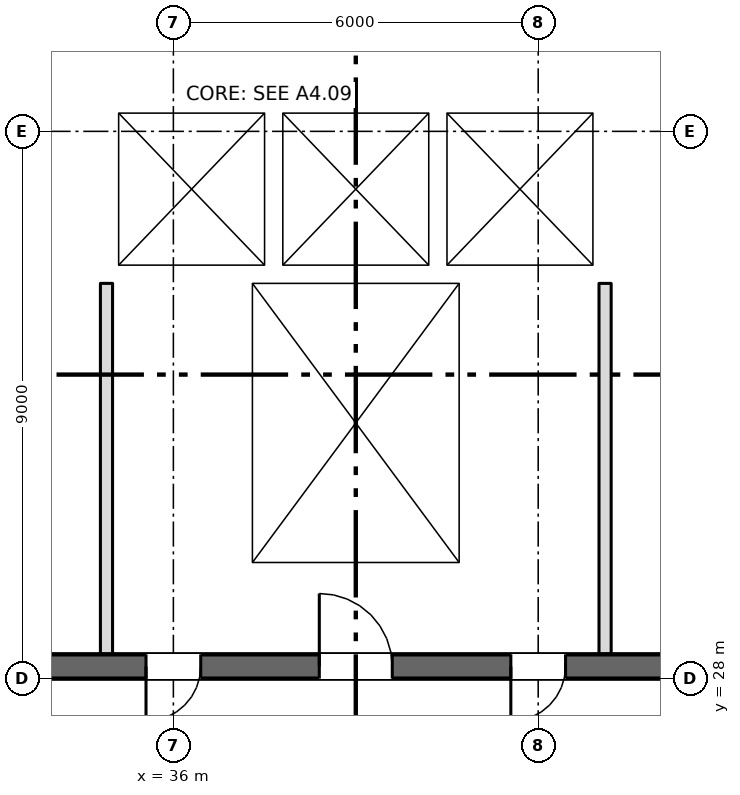
"""IFC4 building model, lengths in metres.
Left out: names, types, materials, properties, quantities, classifications, styles, units other than length and angle.
Written with IfcOpenShell. Run it as: python <this file> out.ifc"""

import sys

from ifc_helpers import new_model, si_unit, direction, frame, frame_2d, origin, place, context, subcontext, project, spatial, rectangle, extrude, element, fill, save


model = new_model("IFC4")
c1 = context("Model", 3, precision=1e-05, world=origin(), true_north=direction((0.0, 1.0)))
c2 = subcontext(c1, "Body", "Model", "MODEL_VIEW")
j1 = project(units=[si_unit("LENGTHUNIT", "METRE"), si_unit("PLANEANGLEUNIT", "RADIAN")], contexts=[c1])
p1 = place(None, origin())
s1 = spatial("IfcSite", under=j1, at=p1, CompositionType="ELEMENT")
p2 = place(p1, origin())
s2 = spatial("IfcBuilding", under=s1, at=p2, CompositionType="ELEMENT")
p3 = place(p2, frame((0.0, 0.0, 41.25)))
s3 = spatial("IfcBuildingStorey", under=s2, at=p3, CompositionType="ELEMENT", Elevation=41.25)
p4 = place(p3, frame((6.7, 28.2, 0.0), z_axis=(0.0, 0.0, 1.0), x_axis=(1.0, 0.0, 0.0)))
e1 = element("IfcWall", 1, at=p4, inside=s3, PredefinedType="SHEAR", context=c2, shape_type="SweptSolid", body=[
    extrude(rectangle(XDim=57.8, YDim=0.4, at=frame_2d((28.9, 0.0))), origin(), (0.0, 0.0, 1.0), 3.35),
])
p5 = place(p4, frame((12.812, 0.0, 0.0)))
e2 = element("IfcOpeningElement", 2, at=p5, cuts=e1, PredefinedType="OPENING", context=c2, shape_type="SweptSolid", body=[
    extrude(rectangle(XDim=0.9, YDim=2.1, at=frame_2d((0.45, 1.05))), frame((0.0, 0.21, 0.0), z_axis=(0.0, -1.0, 0.0), x_axis=(1.0, 0.0, 0.0)), (0.0, 0.0, 1.0), 0.42),
])
p6 = place(p4, frame((15.387, 0.0, 0.0)))
e3 = element("IfcOpeningElement", 3, at=p6, cuts=e1, PredefinedType="OPENING", context=c2, shape_type="SweptSolid", body=[
    extrude(rectangle(XDim=0.9, YDim=2.1, at=frame_2d((0.45, 1.05))), frame((0.0, 0.21, 0.0), z_axis=(0.0, -1.0, 0.0), x_axis=(1.0, 0.0, 0.0)), (0.0, 0.0, 1.0), 0.42),
])
p7 = place(p4, frame((48.312, 0.0, 0.0)))
e4 = element("IfcOpeningElement", 4, at=p7, cuts=e1, PredefinedType="OPENING", context=c2, shape_type="SweptSolid", body=[
    extrude(rectangle(XDim=0.9, YDim=2.1, at=frame_2d((0.45, 1.05))), frame((0.0, 0.21, 0.0), z_axis=(0.0, -1.0, 0.0), x_axis=(1.0, 0.0, 0.0)), (0.0, 0.0, 1.0), 0.42),
])
p8 = place(p4, frame((50.887, 0.0, 0.0)))
e5 = element("IfcOpeningElement", 5, at=p8, cuts=e1, PredefinedType="OPENING", context=c2, shape_type="SweptSolid", body=[
    extrude(rectangle(XDim=0.9, YDim=2.1, at=frame_2d((0.45, 1.05))), frame((0.0, 0.21, 0.0), z_axis=(0.0, -1.0, 0.0), x_axis=(1.0, 0.0, 0.0)), (0.0, 0.0, 1.0), 0.42),
])
p9 = place(p4, frame((0.562, 0.0, 0.0)))
e6 = element("IfcOpeningElement", 6, at=p9, cuts=e1, PredefinedType="OPENING", context=c2, shape_type="SweptSolid", body=[
    extrude(rectangle(XDim=0.9, YDim=2.1, at=frame_2d((0.45, 1.05))), frame((0.0, 0.21, 0.0), z_axis=(0.0, -1.0, 0.0), x_axis=(1.0, 0.0, 0.0)), (0.0, 0.0, 1.0), 0.42),
])
p10 = place(p4, frame((2.137, 0.0, 0.0)))
e7 = element("IfcOpeningElement", 7, at=p10, cuts=e1, PredefinedType="OPENING", context=c2, shape_type="SweptSolid", body=[
    extrude(rectangle(XDim=0.9, YDim=2.1, at=frame_2d((0.45, 1.05))), frame((0.0, 0.21, 0.0), z_axis=(0.0, -1.0, 0.0), x_axis=(1.0, 0.0, 0.0)), (0.0, 0.0, 1.0), 0.42),
])
p11 = place(p4, frame((4.7, 0.0, 0.0)))
e8 = element("IfcOpeningElement", 8, at=p11, cuts=e1, PredefinedType="OPENING", context=c2, shape_type="SweptSolid", body=[
    extrude(rectangle(XDim=1.2, YDim=2.1, at=frame_2d((0.6, 1.05))), frame((0.0, 0.21, 0.0), z_axis=(0.0, -1.0, 0.0), x_axis=(1.0, 0.0, 0.0)), (0.0, 0.0, 1.0), 0.42),
])
p12 = place(p4, frame((31.7, 0.0, 0.0)))
e9 = element("IfcOpeningElement", 9, at=p12, cuts=e1, PredefinedType="OPENING", context=c2, shape_type="SweptSolid", body=[
    extrude(rectangle(XDim=1.2, YDim=2.1, at=frame_2d((0.6, 1.05))), frame((0.0, 0.21, 0.0), z_axis=(0.0, -1.0, 0.0), x_axis=(1.0, 0.0, 0.0)), (0.0, 0.0, 1.0), 0.42),
])
p13 = place(p4, frame((55.2, 0.0, 0.0)))
e10 = element("IfcOpeningElement", 10, at=p13, cuts=e1, PredefinedType="OPENING", context=c2, shape_type="SweptSolid", body=[
    extrude(rectangle(XDim=1.2, YDim=2.1, at=frame_2d((0.6, 1.05))), frame((0.0, 0.21, 0.0), z_axis=(0.0, -1.0, 0.0), x_axis=(1.0, 0.0, 0.0)), (0.0, 0.0, 1.0), 0.42),
])
p14 = place(p4, frame((21.7, 0.0, 0.0)))
e11 = element("IfcOpeningElement", 11, at=p14, cuts=e1, PredefinedType="OPENING", context=c2, shape_type="SweptSolid", body=[
    extrude(rectangle(XDim=1.2, YDim=2.1, at=frame_2d((0.6, 1.05))), frame((0.0, 0.21, 0.0), z_axis=(0.0, -1.0, 0.0), x_axis=(1.0, 0.0, 0.0)), (0.0, 0.0, 1.0), 0.42),
])
p15 = place(p4, frame((41.7, 0.0, 0.0)))
e12 = element("IfcOpeningElement", 12, at=p15, cuts=e1, PredefinedType="OPENING", context=c2, shape_type="SweptSolid", body=[
    extrude(rectangle(XDim=1.2, YDim=2.1, at=frame_2d((0.6, 1.05))), frame((0.0, 0.21, 0.0), z_axis=(0.0, -1.0, 0.0), x_axis=(1.0, 0.0, 0.0)), (0.0, 0.0, 1.0), 0.42),
])
p16 = place(p4, frame((24.85, 0.0, 0.0)))
e13 = element("IfcOpeningElement", 13, at=p16, cuts=e1, PredefinedType="OPENING", context=c2, shape_type="SweptSolid", body=[
    extrude(rectangle(XDim=2.4, YDim=2.1, at=frame_2d((1.2, 1.05))), frame((0.0, 0.21, 0.0), z_axis=(0.0, -1.0, 0.0), x_axis=(1.0, 0.0, 0.0)), (0.0, 0.0, 1.0), 0.42),
])
p17 = place(p4, frame((37.35, 0.0, 0.0)))
e14 = element("IfcOpeningElement", 14, at=p17, cuts=e1, PredefinedType="OPENING", context=c2, shape_type="SweptSolid", body=[
    extrude(rectangle(XDim=2.4, YDim=2.1, at=frame_2d((1.2, 1.05))), frame((0.0, 0.21, 0.0), z_axis=(0.0, -1.0, 0.0), x_axis=(1.0, 0.0, 0.0)), (0.0, 0.0, 1.0), 0.42),
])
p18 = place(p4, frame((7.85, 0.0, 0.0)))
e15 = element("IfcOpeningElement", 15, at=p18, cuts=e1, PredefinedType="OPENING", context=c2, shape_type="SweptSolid", body=[
    extrude(rectangle(XDim=2.4, YDim=2.1, at=frame_2d((1.2, 1.05))), frame((0.0, 0.21, 0.0), z_axis=(0.0, -1.0, 0.0), x_axis=(1.0, 0.0, 0.0)), (0.0, 0.0, 1.0), 0.42),
])
p19 = place(p4, frame((28.85, 0.0, 0.0)))
e16 = element("IfcOpeningElement", 16, at=p19, cuts=e1, PredefinedType="OPENING", context=c2, shape_type="SweptSolid", body=[
    extrude(rectangle(XDim=0.9, YDim=2.1, at=frame_2d((0.45, 1.05))), frame((0.0, 0.21, 0.0), z_axis=(0.0, -1.0, 0.0), x_axis=(1.0, 0.0, 0.0)), (0.0, 0.0, 1.0), 0.42),
])
p20 = place(p4, frame((34.85, 0.0, 0.0)))
e17 = element("IfcOpeningElement", 17, at=p20, cuts=e1, PredefinedType="OPENING", context=c2, shape_type="SweptSolid", body=[
    extrude(rectangle(XDim=0.9, YDim=2.1, at=frame_2d((0.45, 1.05))), frame((0.0, 0.21, 0.0), z_axis=(0.0, -1.0, 0.0), x_axis=(1.0, 0.0, 0.0)), (0.0, 0.0, 1.0), 0.42),
])
for number, where, z_axis, x_axis in (
    (18, (37.15, 28.4, 0.0), (0.0, 0.0, 1.0), (0.0, 1.0, 0.0)),
    (19, (40.85, 28.4, 0.0), (0.0, 0.0, 1.0), (0.0, 1.0, 0.0)),
):
    element("IfcWall", number, at=place(p3, frame(where, z_axis=z_axis, x_axis=x_axis)), inside=s3, PredefinedType="SHEAR", context=c2, shape_type="SweptSolid", body=[
        extrude(rectangle(XDim=6.1, YDim=0.3, at=frame_2d((3.05, 0.0))), origin(), (0.0, 0.0, 1.0), 3.35),
    ])
p21 = place(p3, frame((34.8, 34.65, 0.0), z_axis=(0.0, 0.0, 1.0), x_axis=(1.0, 0.0, 0.0)))
e20 = element("IfcWall", 20, at=p21, inside=s3, PredefinedType="SHEAR", context=c2, shape_type="SweptSolid", body=[
    extrude(rectangle(XDim=8.4, YDim=0.3, at=frame_2d((4.2, 0.0))), origin(), (0.0, 0.0, 1.0), 3.35),
])
p22 = place(p3, frame((34.8, 37.45, 0.0), z_axis=(0.0, 0.0, 1.0), x_axis=(1.0, 0.0, 0.0)))
e21 = element("IfcWall", 21, at=p22, inside=s3, PredefinedType="SHEAR", context=c2, shape_type="SweptSolid", body=[
    extrude(rectangle(XDim=8.4, YDim=0.3, at=frame_2d((4.2, 0.0))), origin(), (0.0, 0.0, 1.0), 3.35),
])
p23 = place(p22, frame((0.95, 0.0, 0.0)))
e22 = element("IfcOpeningElement", 22, at=p23, cuts=e21, PredefinedType="OPENING", context=c2, shape_type="SweptSolid", body=[
    extrude(rectangle(XDim=1.1, YDim=2.1, at=frame_2d((0.55, 1.05))), frame((0.0, 0.16, 0.0), z_axis=(0.0, -1.0, 0.0), x_axis=(1.0, 0.0, 0.0)), (0.0, 0.0, 1.0), 0.32),
])
p24 = place(p22, frame((3.65, 0.0, 0.0)))
e23 = element("IfcOpeningElement", 23, at=p24, cuts=e21, PredefinedType="OPENING", context=c2, shape_type="SweptSolid", body=[
    extrude(rectangle(XDim=1.1, YDim=2.1, at=frame_2d((0.55, 1.05))), frame((0.0, 0.16, 0.0), z_axis=(0.0, -1.0, 0.0), x_axis=(1.0, 0.0, 0.0)), (0.0, 0.0, 1.0), 0.32),
])
p25 = place(p22, frame((6.35, 0.0, 0.0)))
e24 = element("IfcOpeningElement", 24, at=p25, cuts=e21, PredefinedType="OPENING", context=c2, shape_type="SweptSolid", body=[
    extrude(rectangle(XDim=1.1, YDim=2.1, at=frame_2d((0.55, 1.05))), frame((0.0, 0.16, 0.0), z_axis=(0.0, -1.0, 0.0), x_axis=(1.0, 0.0, 0.0)), (0.0, 0.0, 1.0), 0.32),
])
for number, where, z_axis, x_axis in (
    (25, (34.95, 34.8, 0.0), (0.0, 0.0, 1.0), (0.0, 1.0, 0.0)),
    (26, (43.05, 34.8, 0.0), (0.0, 0.0, 1.0), (0.0, 1.0, 0.0)),
    (27, (37.65, 34.8, 0.0), (0.0, 0.0, 1.0), (0.0, 1.0, 0.0)),
    (28, (40.35, 34.8, 0.0), (0.0, 0.0, 1.0), (0.0, 1.0, 0.0)),
):
    element("IfcWall", number, at=place(p3, frame(where, z_axis=z_axis, x_axis=x_axis)), inside=s3, PredefinedType="SHEAR", context=c2, shape_type="SweptSolid", body=[
        extrude(rectangle(XDim=2.5, YDim=0.3, at=frame_2d((1.25, 0.0))), origin(), (0.0, 0.0, 1.0), 3.35),
    ])
for number, where, z_axis, x_axis in (
    (29, (34.9, 28.4, 0.0), (0.0, 0.0, 1.0), (0.0, 1.0, 0.0)),
    (30, (43.1, 28.4, 0.0), (0.0, 0.0, 1.0), (0.0, 1.0, 0.0)),
):
    element("IfcWall", number, at=place(p3, frame(where, z_axis=z_axis, x_axis=x_axis)), inside=s3, PredefinedType="PARTITIONING", context=c2, shape_type="SweptSolid", body=[
        extrude(rectangle(XDim=6.1, YDim=0.2, at=frame_2d((3.05, 0.0))), origin(), (0.0, 0.0, 1.0), 3.35),
    ])
p26 = place(p23, origin())
e31 = element("IfcDoor", 31, at=p26, inside=s3, OperationType="SLIDING_TO_LEFT", PredefinedType="DOOR", context=c2, shape_type="SweptSolid", body=[
    extrude(rectangle(XDim=1.1, YDim=2.1, at=frame_2d((0.55, 1.05))), frame((0.0, 0.025, 0.0), z_axis=(0.0, -1.0, 0.0), x_axis=(1.0, 0.0, 0.0)), (0.0, 0.0, 1.0), 0.05),
])
fill(e22, e31)
p27 = place(p24, origin())
e32 = element("IfcDoor", 32, at=p27, inside=s3, OperationType="SLIDING_TO_LEFT", PredefinedType="DOOR", context=c2, shape_type="SweptSolid", body=[
    extrude(rectangle(XDim=1.1, YDim=2.1, at=frame_2d((0.55, 1.05))), frame((0.0, 0.025, 0.0), z_axis=(0.0, -1.0, 0.0), x_axis=(1.0, 0.0, 0.0)), (0.0, 0.0, 1.0), 0.05),
])
fill(e23, e32)
p28 = place(p25, origin())
e33 = element("IfcDoor", 33, at=p28, inside=s3, OperationType="SLIDING_TO_LEFT", PredefinedType="DOOR", context=c2, shape_type="SweptSolid", body=[
    extrude(rectangle(XDim=1.1, YDim=2.1, at=frame_2d((0.55, 1.05))), frame((0.0, 0.025, 0.0), z_axis=(0.0, -1.0, 0.0), x_axis=(1.0, 0.0, 0.0)), (0.0, 0.0, 1.0), 0.05),
])
fill(e24, e33)
p29 = place(p12, origin())
e34 = element("IfcDoor", 34, at=p29, inside=s3, OperationType="SINGLE_SWING_LEFT", PredefinedType="DOOR", context=c2, shape_type="SweptSolid", body=[
    extrude(rectangle(XDim=1.2, YDim=2.1, at=frame_2d((0.6, 1.05))), frame((0.0, 0.025, 0.0), z_axis=(0.0, -1.0, 0.0), x_axis=(1.0, 0.0, 0.0)), (0.0, 0.0, 1.0), 0.05),
])
fill(e9, e34)
p30 = place(p19, origin())
e35 = element("IfcDoor", 35, at=p30, inside=s3, OperationType="SINGLE_SWING_LEFT", PredefinedType="DOOR", context=c2, shape_type="SweptSolid", body=[
    extrude(rectangle(XDim=0.9, YDim=2.1, at=frame_2d((0.45, 1.05))), frame((0.0, 0.025, 0.0), z_axis=(0.0, -1.0, 0.0), x_axis=(1.0, 0.0, 0.0)), (0.0, 0.0, 1.0), 0.05),
])
fill(e16, e35)
p31 = place(p20, origin())
e36 = element("IfcDoor", 36, at=p31, inside=s3, OperationType="SINGLE_SWING_LEFT", PredefinedType="DOOR", context=c2, shape_type="SweptSolid", body=[
    extrude(rectangle(XDim=0.9, YDim=2.1, at=frame_2d((0.45, 1.05))), frame((0.0, 0.025, 0.0), z_axis=(0.0, -1.0, 0.0), x_axis=(1.0, 0.0, 0.0)), (0.0, 0.0, 1.0), 0.05),
])
fill(e17, e36)
save(model, sys.argv[1])
